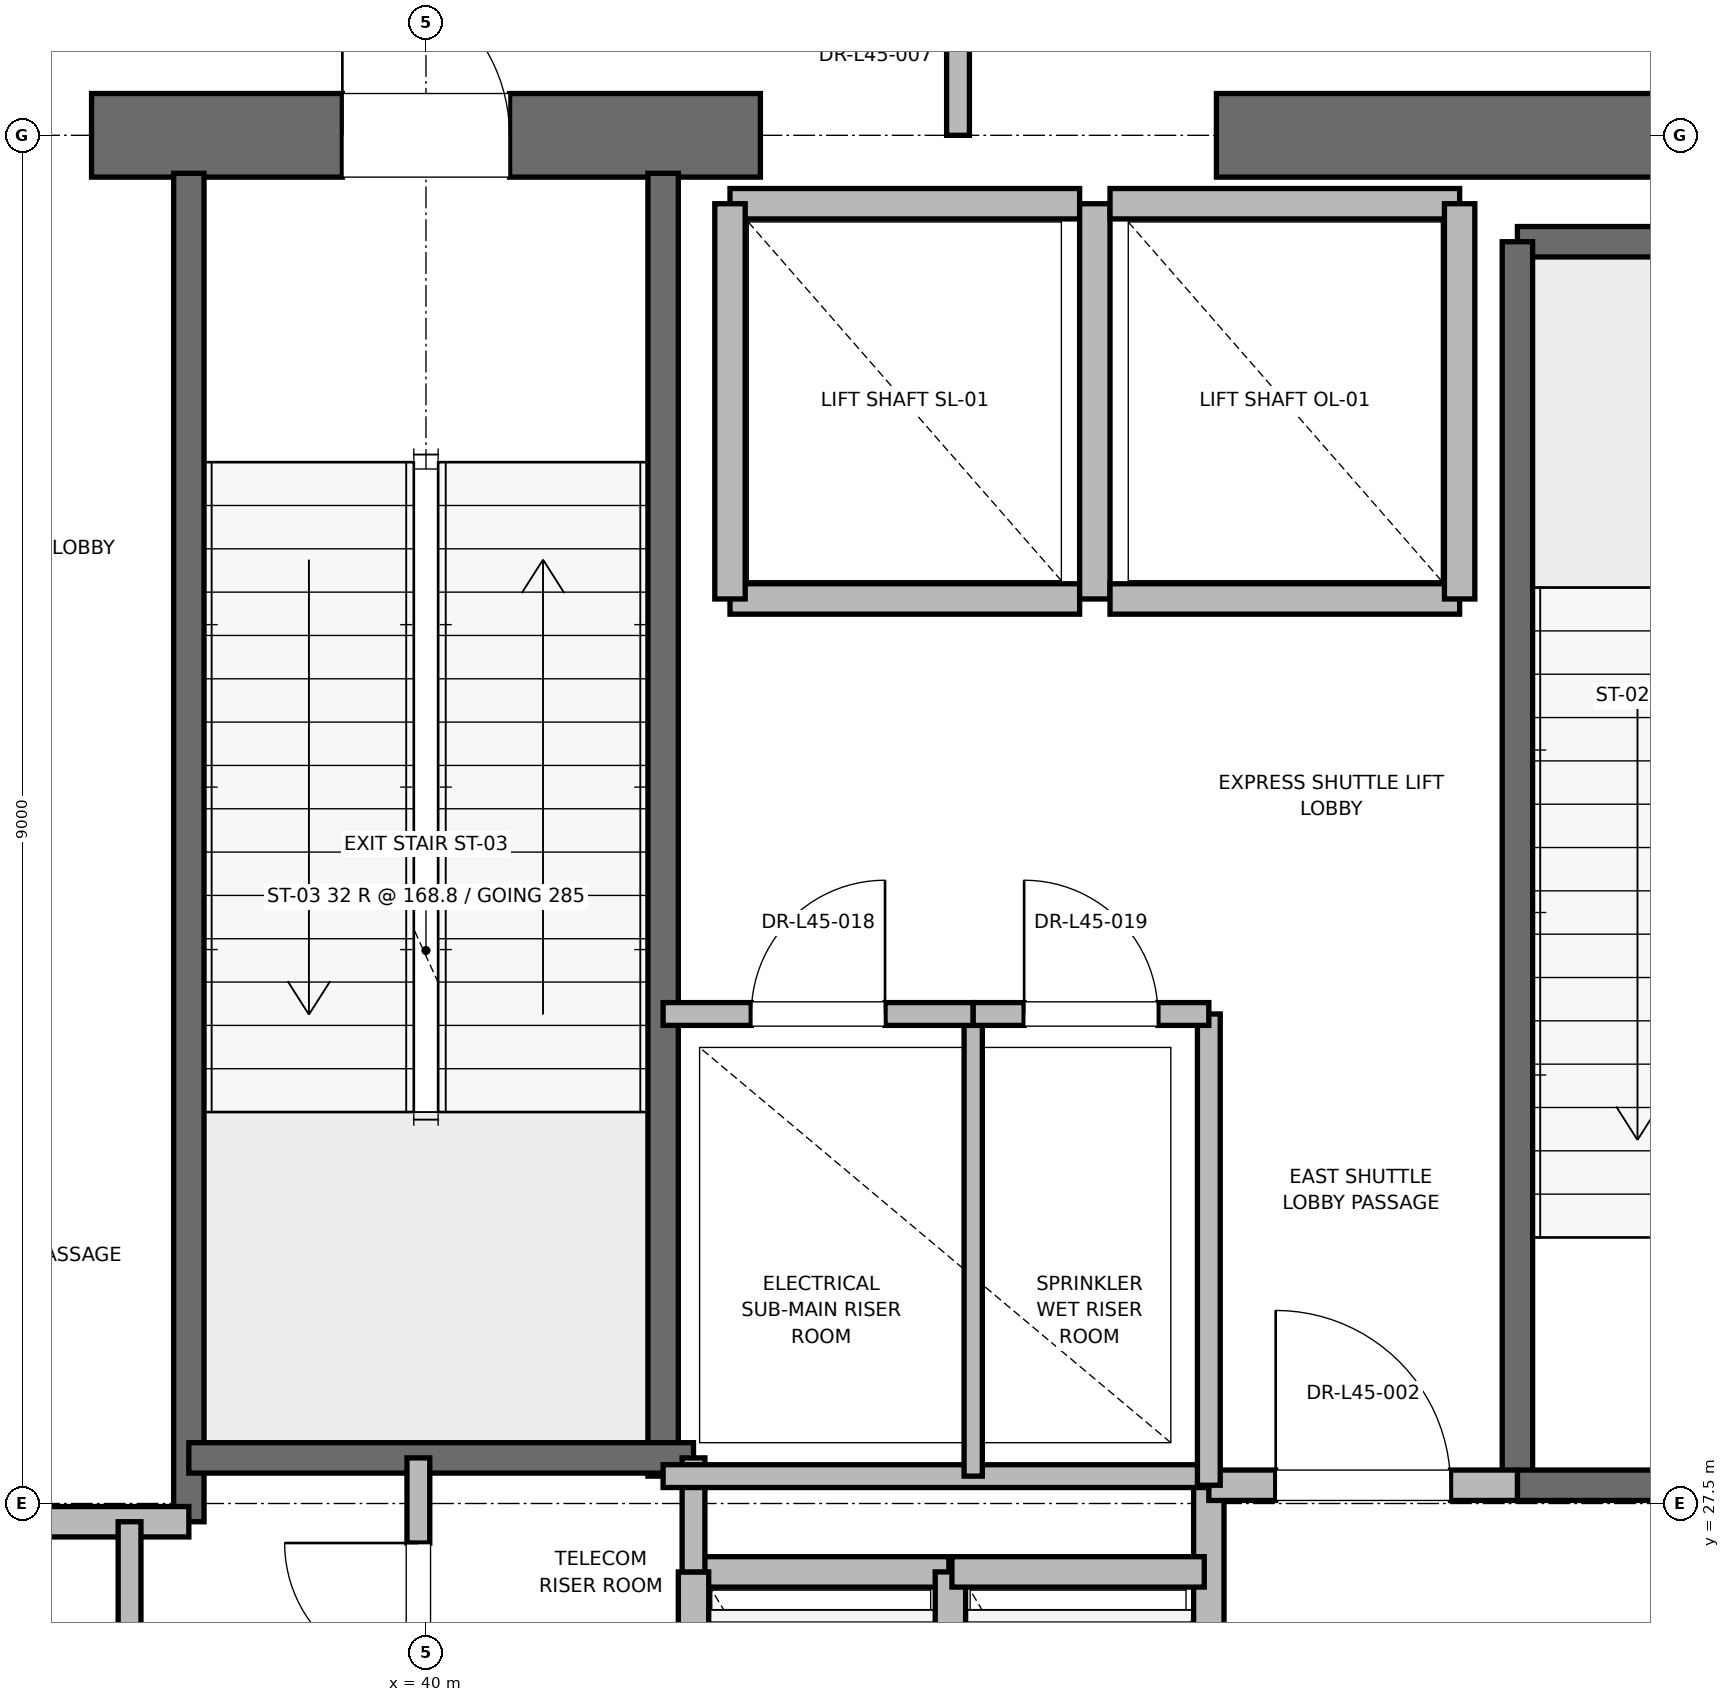
"""IFC4 building model, lengths in metres.
Left out: names, types, materials, properties, quantities, classifications, styles, units other than length and angle.
Written with IfcOpenShell. Run it as: python <this file> out.ifc"""

import sys

from ifc_helpers import new_model, si_unit, direction, frame, frame_2d, origin, place, context, subcontext, project, spatial, rectangle, extrude, element, fill, save


model = new_model("IFC4")
c1 = context("Model", 3, precision=1e-05, world=origin(), true_north=direction((0.0, 1.0)))
c2 = subcontext(c1, "Body", "Model", "MODEL_VIEW")
j1 = project(units=[si_unit("LENGTHUNIT", "METRE"), si_unit("PLANEANGLEUNIT", "RADIAN")], contexts=[c1])
p1 = place(None, origin())
s1 = spatial("IfcSite", under=j1, at=p1, CompositionType="ELEMENT")
p2 = place(p1, origin())
s2 = spatial("IfcBuilding", under=s1, at=p2, CompositionType="ELEMENT")
p3 = place(p2, frame((0.0, 0.0, 194.8)))
s3 = spatial("IfcBuildingStorey", under=s2, at=p3, CompositionType="ELEMENT", Elevation=194.8)
p4 = place(p3, frame((37.8, 36.5, 0.0), z_axis=(0.0, 0.0, 1.0), x_axis=(1.0, 0.0, 0.0)))
e1 = element("IfcWall", 1, at=p4, inside=s3, PredefinedType="SHEAR", context=c2, shape_type="SweptSolid", body=[
    extrude(rectangle(XDim=4.4, YDim=0.55, at=frame_2d((2.2, 0.0))), origin(), (0.0, 0.0, 1.0), 5.1),
])
p5 = place(p4, frame((1.65, 0.0, 0.0)))
e2 = element("IfcOpeningElement", 2, at=p5, cuts=e1, PredefinedType="OPENING", context=c2, shape_type="SweptSolid", body=[
    extrude(rectangle(XDim=1.1, YDim=2.15, at=frame_2d((0.55, 1.075))), frame((0.0, 0.275, 0.0), z_axis=(0.0, -1.0, 0.0), x_axis=(1.0, 0.0, 0.0)), (0.0, 0.0, 1.0), 0.55),
])
p6 = place(p3, frame((45.2, 36.5, 0.0), z_axis=(0.0, 0.0, 1.0), x_axis=(1.0, 0.0, 0.0)))
e3 = element("IfcWall", 3, at=p6, inside=s3, PredefinedType="SHEAR", context=c2, shape_type="SweptSolid", body=[
    extrude(rectangle(XDim=5.8, YDim=0.55, at=frame_2d((2.9, 0.0))), origin(), (0.0, 0.0, 1.0), 5.1),
])
p7 = place(p3, frame((47.18, 35.8, 0.0), z_axis=(0.0, 0.0, 1.0), x_axis=(1.0, 0.0, 0.0)))
e4 = element("IfcWall", 4, at=p7, inside=s3, PredefinedType="SOLIDWALL", context=c2, shape_type="SweptSolid", body=[
    extrude(rectangle(XDim=3.12, YDim=0.2, at=frame_2d((1.56, 0.0))), origin(), (0.0, 0.0, 1.0), 5.1),
])
p8 = place(p3, frame((47.18, 27.62, 0.0), z_axis=(0.0, 0.0, 1.0), x_axis=(0.0, 1.0, 0.0)))
e5 = element("IfcWall", 5, at=p8, inside=s3, PredefinedType="SOLIDWALL", context=c2, shape_type="SweptSolid", body=[
    extrude(rectangle(XDim=8.18, YDim=0.2, at=frame_2d((4.09, 0.0))), origin(), (0.0, 0.0, 1.0), 5.1),
])
p9 = place(p3, frame((47.18, 27.62, 0.0), z_axis=(0.0, 0.0, 1.0), x_axis=(1.0, 0.0, 0.0)))
e6 = element("IfcWall", 6, at=p9, inside=s3, PredefinedType="SOLIDWALL", context=c2, shape_type="SweptSolid", body=[
    extrude(rectangle(XDim=3.12, YDim=0.2, at=frame_2d((1.56, 0.0))), origin(), (0.0, 0.0, 1.0), 5.1),
])
p10 = place(p9, frame((1.01, 0.0, 0.0)))
e7 = element("IfcOpeningElement", 7, at=p10, cuts=e6, PredefinedType="OPENING", context=c2, shape_type="SweptSolid", body=[
    extrude(rectangle(XDim=1.1, YDim=2.15, at=frame_2d((0.55, 1.075))), frame((0.0, 0.1, 0.0), z_axis=(0.0, -1.0, 0.0), x_axis=(1.0, 0.0, 0.0)), (0.0, 0.0, 1.0), 0.2),
])
p11 = place(p3, frame((38.44, 27.38, 0.0), z_axis=(0.0, 0.0, 1.0), x_axis=(0.0, 1.0, 0.0)))
e8 = element("IfcWall", 8, at=p11, inside=s3, PredefinedType="SOLIDWALL", context=c2, shape_type="SweptSolid", body=[
    extrude(rectangle(XDim=8.87, YDim=0.2, at=frame_2d((4.435, 0.0))), origin(), (0.0, 0.0, 1.0), 5.1),
])
p12 = place(p3, frame((41.56, 27.68, 0.0), z_axis=(0.0, 0.0, 1.0), x_axis=(0.0, 1.0, 0.0)))
e9 = element("IfcWall", 9, at=p12, inside=s3, PredefinedType="SOLIDWALL", context=c2, shape_type="SweptSolid", body=[
    extrude(rectangle(XDim=8.57, YDim=0.2, at=frame_2d((4.285, 0.0))), origin(), (0.0, 0.0, 1.0), 5.1),
])
p13 = place(p3, frame((38.44, 27.8, 0.0), z_axis=(0.0, 0.0, 1.0), x_axis=(1.0, 0.0, 0.0)))
e10 = element("IfcWall", 10, at=p13, inside=s3, PredefinedType="SOLIDWALL", context=c2, shape_type="SweptSolid", body=[
    extrude(rectangle(XDim=3.32, YDim=0.2, at=frame_2d((1.66, 0.0))), origin(), (0.0, 0.0, 1.0), 5.1),
])
p14 = place(p3, frame((32.82, 27.38, 0.0), z_axis=(0.0, 0.0, 1.0), x_axis=(1.0, 0.0, 0.0)))
e11 = element("IfcWall", 11, at=p14, inside=s3, PredefinedType="PARTITIONING", context=c2, shape_type="SweptSolid", body=[
    extrude(rectangle(XDim=5.62, YDim=0.2, at=frame_2d((2.81, 0.0))), origin(), (0.0, 0.0, 1.0), 5.1),
])
p15 = place(p3, frame((45.15, 24.25, 0.0), z_axis=(0.0, 0.0, 1.0), x_axis=(0.0, 1.0, 0.0)))
e12 = element("IfcWall", 12, at=p15, inside=s3, PredefinedType="PARTITIONING", context=c2, shape_type="SweptSolid", body=[
    extrude(rectangle(XDim=3.37, YDim=0.2, at=frame_2d((1.685, 0.0))), origin(), (0.0, 0.0, 1.0), 5.1),
])
p16 = place(p3, frame((45.15, 27.62, 0.0), z_axis=(0.0, 0.0, 1.0), x_axis=(1.0, 0.0, 0.0)))
e13 = element("IfcWall", 13, at=p16, inside=s3, PredefinedType="PARTITIONING", context=c2, shape_type="SweptSolid", body=[
    extrude(rectangle(XDim=2.03, YDim=0.2, at=frame_2d((1.015, 0.0))), origin(), (0.0, 0.0, 1.0), 5.1),
])
p17 = place(p16, frame((0.44, 0.0, 0.0)))
e14 = element("IfcOpeningElement", 14, at=p17, cuts=e13, PredefinedType="OPENING", context=c2, shape_type="SweptSolid", body=[
    extrude(rectangle(XDim=1.15, YDim=2.2, at=frame_2d((0.575, 1.1))), frame((0.0, 0.1, 0.0), z_axis=(0.0, -1.0, 0.0), x_axis=(1.0, 0.0, 0.0)), (0.0, 0.0, 1.0), 0.2),
])
p18 = place(p3, frame((43.44, 27.05, 0.0), z_axis=(0.0, 0.0, 1.0), x_axis=(-1.0, 0.0, 0.0)))
e15 = element("IfcWall", 15, at=p18, inside=s3, PredefinedType="SOLIDWALL", context=c2, shape_type="SweptSolid", body=[
    extrude(rectangle(XDim=1.68, YDim=0.2, at=frame_2d((0.84, 0.0))), origin(), (0.0, 0.0, 1.0), 5.1),
])
for number, where, z_axis, x_axis in (
    (16, (41.76, 27.05, 0.0), (0.0, 0.0, 1.0), (0.0, -1.0, 0.0)),
    (17, (43.45, 24.45, 0.0), (0.0, 0.0, 1.0), (0.0, 1.0, 0.0)),
):
    element("IfcWall", number, at=place(p3, frame(where, z_axis=z_axis, x_axis=x_axis)), inside=s3, PredefinedType="SOLIDWALL", context=c2, shape_type="SweptSolid", body=[
        extrude(rectangle(XDim=2.6, YDim=0.2, at=frame_2d((1.3, 0.0))), origin(), (0.0, 0.0, 1.0), 5.1),
    ])
p19 = place(p3, frame((45.12, 27.05, 0.0), z_axis=(0.0, 0.0, 1.0), x_axis=(-1.0, 0.0, 0.0)))
e18 = element("IfcWall", 18, at=p19, inside=s3, PredefinedType="SOLIDWALL", context=c2, shape_type="SweptSolid", body=[
    extrude(rectangle(XDim=1.66, YDim=0.2, at=frame_2d((0.83, 0.0))), origin(), (0.0, 0.0, 1.0), 5.1),
])
p20 = place(p3, frame((42.0, 33.45, 0.0), z_axis=(0.0, 0.0, 1.0), x_axis=(1.0, 0.0, 0.0)))
e19 = element("IfcWall", 19, at=p20, inside=s3, PredefinedType="SOLIDWALL", context=c2, shape_type="SweptSolid", body=[
    extrude(rectangle(XDim=2.3, YDim=0.2, at=frame_2d((1.15, 0.0))), origin(), (0.0, 0.0, 1.0), 5.1),
])
p21 = place(p3, frame((44.3, 36.05, 0.0), z_axis=(0.0, 0.0, 1.0), x_axis=(-1.0, 0.0, 0.0)))
e20 = element("IfcWall", 20, at=p21, inside=s3, PredefinedType="SOLIDWALL", context=c2, shape_type="SweptSolid", body=[
    extrude(rectangle(XDim=2.3, YDim=0.2, at=frame_2d((1.15, 0.0))), origin(), (0.0, 0.0, 1.0), 4.08),
])
for number, where, z_axis, x_axis in (
    (21, (42.0, 36.05, 0.0), (0.0, 0.0, 1.0), (0.0, -1.0, 0.0)),
    (22, (44.4, 33.45, 0.0), (0.0, 0.0, 1.0), (0.0, 1.0, 0.0)),
):
    element("IfcWall", number, at=place(p3, frame(where, z_axis=z_axis, x_axis=x_axis)), inside=s3, PredefinedType="SOLIDWALL", context=c2, shape_type="SweptSolid", body=[
        extrude(rectangle(XDim=2.6, YDim=0.2, at=frame_2d((1.3, 0.0))), origin(), (0.0, 0.0, 1.0), 4.08),
    ])
p22 = place(p3, frame((44.5, 33.45, 0.0), z_axis=(0.0, 0.0, 1.0), x_axis=(1.0, 0.0, 0.0)))
e23 = element("IfcWall", 23, at=p22, inside=s3, PredefinedType="SOLIDWALL", context=c2, shape_type="SweptSolid", body=[
    extrude(rectangle(XDim=2.3, YDim=0.2, at=frame_2d((1.15, 0.0))), origin(), (0.0, 0.0, 1.0), 5.1),
])
p23 = place(p3, frame((46.8, 36.05, 0.0), z_axis=(0.0, 0.0, 1.0), x_axis=(-1.0, 0.0, 0.0)))
e24 = element("IfcWall", 24, at=p23, inside=s3, PredefinedType="SOLIDWALL", context=c2, shape_type="SweptSolid", body=[
    extrude(rectangle(XDim=2.3, YDim=0.2, at=frame_2d((1.15, 0.0))), origin(), (0.0, 0.0, 1.0), 4.08),
])
p24 = place(p3, frame((46.8, 33.45, 0.0), z_axis=(0.0, 0.0, 1.0), x_axis=(0.0, 1.0, 0.0)))
e25 = element("IfcWall", 25, at=p24, inside=s3, PredefinedType="SOLIDWALL", context=c2, shape_type="SweptSolid", body=[
    extrude(rectangle(XDim=2.6, YDim=0.2, at=frame_2d((1.3, 0.0))), origin(), (0.0, 0.0, 1.0), 5.1),
])
p25 = place(p3, frame((41.76, 27.05, 0.0), z_axis=(0.0, 0.0, 1.0), x_axis=(0.0, 1.0, 0.0)))
e26 = element("IfcWall", 26, at=p25, inside=s3, PredefinedType="PARTITIONING", context=c2, shape_type="SweptSolid", body=[
    extrude(rectangle(XDim=0.75, YDim=0.15, at=frame_2d((0.375, 0.0))), origin(), (0.0, 0.0, 1.0), 2.85),
])
p26 = place(p3, frame((39.95, 25.8, 0.0), z_axis=(0.0, 0.0, 1.0), x_axis=(0.0, 1.0, 0.0)))
e27 = element("IfcWall", 27, at=p26, inside=s3, PredefinedType="PARTITIONING", context=c2, shape_type="SweptSolid", body=[
    extrude(rectangle(XDim=2.0, YDim=0.15, at=frame_2d((1.0, 0.0))), origin(), (0.0, 0.0, 1.0), 2.85),
])
p27 = place(p26, frame((0.56, 0.0, 0.0)))
e28 = element("IfcOpeningElement", 28, at=p27, cuts=e27, PredefinedType="OPENING", context=c2, shape_type="SweptSolid", body=[
    extrude(rectangle(XDim=0.88, YDim=2.1, at=frame_2d((0.44, 1.05))), frame((0.0, 0.075, 0.0), z_axis=(0.0, -1.0, 0.0), x_axis=(1.0, 0.0, 0.0)), (0.0, 0.0, 1.0), 0.15),
])
p28 = place(p3, frame((38.05, 24.5, 0.0), z_axis=(0.0, 0.0, 1.0), x_axis=(0.0, 1.0, 0.0)))
e29 = element("IfcWall", 29, at=p28, inside=s3, PredefinedType="PARTITIONING", context=c2, shape_type="SweptSolid", body=[
    extrude(rectangle(XDim=2.88, YDim=0.15, at=frame_2d((1.44, 0.0))), origin(), (0.0, 0.0, 1.0), 2.85),
])
p29 = place(p28, frame((1.0, 0.0, 0.0)))
e30 = element("IfcOpeningElement", 30, at=p29, cuts=e29, PredefinedType="OPENING", context=c2, shape_type="SweptSolid", body=[
    extrude(rectangle(XDim=0.88, YDim=2.1, at=frame_2d((0.44, 1.05))), frame((0.0, 0.075, 0.0), z_axis=(0.0, -1.0, 0.0), x_axis=(1.0, 0.0, 0.0)), (0.0, 0.0, 1.0), 0.15),
])
p30 = place(p3, frame((41.56, 27.68, 0.0), z_axis=(0.0, 0.0, 1.0), x_axis=(1.0, 0.0, 0.0)))
e31 = element("IfcWall", 31, at=p30, inside=s3, PredefinedType="PARTITIONING", context=c2, shape_type="SweptSolid", body=[
    extrude(rectangle(XDim=3.59, YDim=0.15, at=frame_2d((1.795, 0.0))), origin(), (0.0, 0.0, 1.0), 2.85),
])
p31 = place(p3, frame((45.15, 27.62, 0.0), z_axis=(0.0, 0.0, 1.0), x_axis=(0.0, 1.0, 0.0)))
e32 = element("IfcWall", 32, at=p31, inside=s3, PredefinedType="PARTITIONING", context=c2, shape_type="SweptSolid", body=[
    extrude(rectangle(XDim=3.1, YDim=0.15, at=frame_2d((1.55, 0.0))), origin(), (0.0, 0.0, 1.0), 2.85),
])
p32 = place(p3, frame((43.6, 27.68, 0.0), z_axis=(0.0, 0.0, 1.0), x_axis=(0.0, 1.0, 0.0)))
e33 = element("IfcWall", 33, at=p32, inside=s3, PredefinedType="PARTITIONING", context=c2, shape_type="SweptSolid", body=[
    extrude(rectangle(XDim=3.04, YDim=0.12, at=frame_2d((1.52, 0.0))), origin(), (0.0, 0.0, 1.0), 2.85),
])
p33 = place(p3, frame((41.56, 30.72, 0.0), z_axis=(0.0, 0.0, 1.0), x_axis=(1.0, 0.0, 0.0)))
e34 = element("IfcWall", 34, at=p33, inside=s3, PredefinedType="PARTITIONING", context=c2, shape_type="SweptSolid", body=[
    extrude(rectangle(XDim=2.04, YDim=0.15, at=frame_2d((1.02, 0.0))), origin(), (0.0, 0.0, 1.0), 2.85),
])
p34 = place(p33, frame((0.58, 0.0, 0.0)))
e35 = element("IfcOpeningElement", 35, at=p34, cuts=e34, PredefinedType="OPENING", context=c2, shape_type="SweptSolid", body=[
    extrude(rectangle(XDim=0.88, YDim=2.1, at=frame_2d((0.44, 1.05))), frame((0.0, 0.075, 0.0), z_axis=(0.0, -1.0, 0.0), x_axis=(1.0, 0.0, 0.0)), (0.0, 0.0, 1.0), 0.15),
])
p35 = place(p3, frame((43.6, 30.72, 0.0), z_axis=(0.0, 0.0, 1.0), x_axis=(1.0, 0.0, 0.0)))
e36 = element("IfcWall", 36, at=p35, inside=s3, PredefinedType="PARTITIONING", context=c2, shape_type="SweptSolid", body=[
    extrude(rectangle(XDim=1.55, YDim=0.15, at=frame_2d((0.775, 0.0))), origin(), (0.0, 0.0, 1.0), 2.85),
])
p36 = place(p35, frame((0.335, 0.0, 0.0)))
e37 = element("IfcOpeningElement", 37, at=p36, cuts=e36, PredefinedType="OPENING", context=c2, shape_type="SweptSolid", body=[
    extrude(rectangle(XDim=0.88, YDim=2.1, at=frame_2d((0.44, 1.05))), frame((0.0, 0.075, 0.0), z_axis=(0.0, -1.0, 0.0), x_axis=(1.0, 0.0, 0.0)), (0.0, 0.0, 1.0), 0.15),
])
p37 = place(p3, frame((43.5, 36.5, 0.0), z_axis=(0.0, 0.0, 1.0), x_axis=(0.0, 1.0, 0.0)))
e38 = element("IfcWall", 38, at=p37, inside=s3, PredefinedType="PARTITIONING", context=c2, shape_type="SweptSolid", body=[
    extrude(rectangle(XDim=2.7, YDim=0.15, at=frame_2d((1.35, 0.0))), origin(), (0.0, 0.0, 1.0), 2.85),
])
p38 = place(p37, frame((0.875, 0.0, 0.0)))
e39 = element("IfcOpeningElement", 39, at=p38, cuts=e38, PredefinedType="OPENING", context=c2, shape_type="SweptSolid", body=[
    extrude(rectangle(XDim=0.95, YDim=2.15, at=frame_2d((0.475, 1.075))), frame((0.0, 0.075, 0.0), z_axis=(0.0, -1.0, 0.0), x_axis=(1.0, 0.0, 0.0)), (0.0, 0.0, 1.0), 0.15),
])
p39 = place(p5, origin())
e40 = element("IfcDoor", 40, at=p39, inside=s3, OperationType="SINGLE_SWING_LEFT", PredefinedType="DOOR", context=c2, shape_type="SweptSolid", body=[
    extrude(rectangle(XDim=1.1, YDim=2.15, at=frame_2d((0.55, 1.075))), frame((0.0, 0.025, 0.0), z_axis=(0.0, -1.0, 0.0), x_axis=(1.0, 0.0, 0.0)), (0.0, 0.0, 1.0), 0.05),
])
fill(e2, e40)
p40 = place(p17, origin())
e41 = element("IfcDoor", 41, at=p40, inside=s3, OperationType="SINGLE_SWING_LEFT", PredefinedType="DOOR", context=c2, shape_type="SweptSolid", body=[
    extrude(rectangle(XDim=1.15, YDim=2.2, at=frame_2d((0.575, 1.1))), frame((0.0, 0.025, 0.0), z_axis=(0.0, -1.0, 0.0), x_axis=(1.0, 0.0, 0.0)), (0.0, 0.0, 1.0), 0.05),
])
fill(e14, e41)
p41 = place(p27, origin())
e42 = element("IfcDoor", 42, at=p41, inside=s3, OperationType="SINGLE_SWING_RIGHT", PredefinedType="DOOR", context=c2, shape_type="SweptSolid", body=[
    extrude(rectangle(XDim=0.88, YDim=2.1, at=frame_2d((0.44, 1.05))), frame((0.0, 0.025, 0.0), z_axis=(0.0, -1.0, 0.0), x_axis=(1.0, 0.0, 0.0)), (0.0, 0.0, 1.0), 0.05),
])
fill(e28, e42)
p42 = place(p34, origin())
e43 = element("IfcDoor", 43, at=p42, inside=s3, OperationType="SINGLE_SWING_RIGHT", PredefinedType="DOOR", context=c2, shape_type="SweptSolid", body=[
    extrude(rectangle(XDim=0.88, YDim=2.1, at=frame_2d((0.44, 1.05))), frame((0.0, 0.025, 0.0), z_axis=(0.0, -1.0, 0.0), x_axis=(1.0, 0.0, 0.0)), (0.0, 0.0, 1.0), 0.05),
])
fill(e35, e43)
p43 = place(p36, origin())
e44 = element("IfcDoor", 44, at=p43, inside=s3, OperationType="SINGLE_SWING_LEFT", PredefinedType="DOOR", context=c2, shape_type="SweptSolid", body=[
    extrude(rectangle(XDim=0.88, YDim=2.1, at=frame_2d((0.44, 1.05))), frame((0.0, 0.025, 0.0), z_axis=(0.0, -1.0, 0.0), x_axis=(1.0, 0.0, 0.0)), (0.0, 0.0, 1.0), 0.05),
])
fill(e37, e44)
save(model, sys.argv[1])
